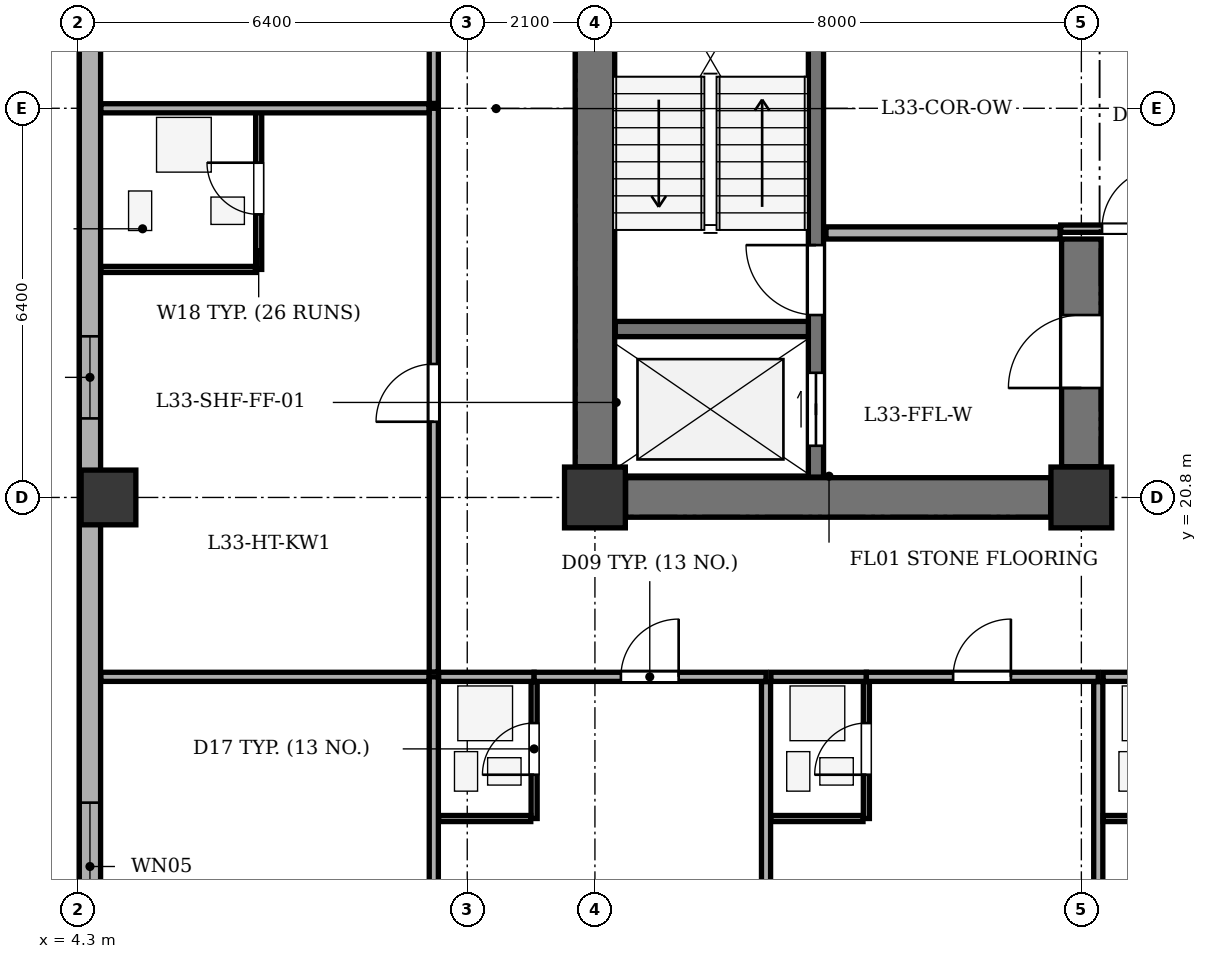
"""IFC4 building model, lengths in metres.
Left out: names, types, materials, properties, quantities, classifications, styles, units other than length and angle.
Written with IfcOpenShell. Run it as: python <this file> out.ifc"""

import sys

from ifc_helpers import new_model, si_unit, direction, frame, frame_2d, origin, origin_2d, place, context, subcontext, project, spatial, rectangle, extrude, element, fill, save


model = new_model("IFC4")
c1 = context("Model", 3, precision=1e-05, world=origin(), true_north=direction((0.0, 1.0)))
c2 = subcontext(c1, "Body", "Model", "MODEL_VIEW")
j1 = project(units=[si_unit("LENGTHUNIT", "METRE"), si_unit("PLANEANGLEUNIT", "RADIAN")], contexts=[c1])
p1 = place(None, origin())
s1 = spatial("IfcSite", under=j1, at=p1, CompositionType="ELEMENT")
p2 = place(p1, origin())
s2 = spatial("IfcBuilding", under=s1, at=p2, CompositionType="ELEMENT")
p3 = place(p2, frame((0.0, 0.0, 134.3)))
s3 = spatial("IfcBuildingStorey", under=s2, at=p3, CompositionType="ELEMENT", Elevation=134.3)
for number, where, z_axis, x_axis in (
    (1, (12.8, 20.8, 0.0), (0.0, 0.0, 1.0), (1.0, 0.0, 0.0)),
    (2, (20.8, 20.8, 0.0), (0.0, 0.0, 1.0), (1.0, 0.0, 0.0)),
):
    element("IfcColumn", number, at=place(p3, frame(where, z_axis=z_axis, x_axis=x_axis)), inside=s3, PredefinedType="COLUMN", context=c2, shape_type="SweptSolid", body=[
        extrude(rectangle(XDim=1.0, YDim=1.0, at=origin_2d()), origin(), (0.0, 0.0, 1.0), 3.5),
    ])
p4 = place(p3, frame((4.8, 20.8, 0.0), z_axis=(0.0, 0.0, 1.0), x_axis=(1.0, 0.0, 0.0)))
e3 = element("IfcColumn", 3, at=p4, inside=s3, PredefinedType="COLUMN", context=c2, shape_type="SweptSolid", body=[
    extrude(rectangle(XDim=0.9, YDim=0.9, at=origin_2d()), origin(), (0.0, 0.0, 1.0), 3.5),
])
p5 = place(p3, frame((4.495, 6.5, 0.0), z_axis=(0.0, 0.0, 1.0), x_axis=(0.0, 1.0, 0.0)))
e4 = element("IfcWall", 4, at=p5, inside=s3, PredefinedType="STANDARD", context=c2, shape_type="SweptSolid", body=[
    extrude(rectangle(XDim=35.0, YDim=0.35, at=frame_2d((17.5, 0.0))), origin(), (0.0, 0.0, 1.0), 2.785),
])
p6 = place(p5, frame((2.595, 0.0, 0.75)))
e5 = element("IfcOpeningElement", 5, at=p6, cuts=e4, PredefinedType="OPENING", context=c2, shape_type="SweptSolid", body=[
    extrude(rectangle(XDim=1.6, YDim=1.75, at=frame_2d((0.8, 0.875))), frame((0.0, 0.185, 0.0), z_axis=(0.0, -1.0, 0.0), x_axis=(1.0, 0.0, 0.0)), (0.0, 0.0, 1.0), 0.37),
])
p7 = place(p5, frame((7.181, 0.0, 0.75)))
e6 = element("IfcOpeningElement", 6, at=p7, cuts=e4, PredefinedType="OPENING", context=c2, shape_type="SweptSolid", body=[
    extrude(rectangle(XDim=2.1, YDim=1.75, at=frame_2d((1.05, 0.875))), frame((0.0, 0.185, 0.0), z_axis=(0.0, -1.0, 0.0), x_axis=(1.0, 0.0, 0.0)), (0.0, 0.0, 1.0), 0.37),
])
p8 = place(p5, frame((15.6, 0.0, 0.75)))
e7 = element("IfcOpeningElement", 7, at=p8, cuts=e4, PredefinedType="OPENING", context=c2, shape_type="SweptSolid", body=[
    extrude(rectangle(XDim=1.35, YDim=1.75, at=frame_2d((0.675, 0.875))), frame((0.0, 0.185, 0.0), z_axis=(0.0, -1.0, 0.0), x_axis=(1.0, 0.0, 0.0)), (0.0, 0.0, 1.0), 0.37),
])
p9 = place(p5, frame((21.752, 0.0, 0.75)))
e8 = element("IfcOpeningElement", 8, at=p9, cuts=e4, PredefinedType="OPENING", context=c2, shape_type="SweptSolid", body=[
    extrude(rectangle(XDim=1.6, YDim=1.75, at=frame_2d((0.8, 0.875))), frame((0.0, 0.185, 0.0), z_axis=(0.0, -1.0, 0.0), x_axis=(1.0, 0.0, 0.0)), (0.0, 0.0, 1.0), 0.37),
])
p10 = place(p5, frame((24.248, 0.0, 0.75)))
e9 = element("IfcOpeningElement", 9, at=p10, cuts=e4, PredefinedType="OPENING", context=c2, shape_type="SweptSolid", body=[
    extrude(rectangle(XDim=1.6, YDim=1.75, at=frame_2d((0.8, 0.875))), frame((0.0, 0.185, 0.0), z_axis=(0.0, -1.0, 0.0), x_axis=(1.0, 0.0, 0.0)), (0.0, 0.0, 1.0), 0.37),
])
p11 = place(p5, frame((31.588, 0.0, 0.75)))
e10 = element("IfcOpeningElement", 10, at=p11, cuts=e4, PredefinedType="OPENING", context=c2, shape_type="SweptSolid", body=[
    extrude(rectangle(XDim=1.6, YDim=1.75, at=frame_2d((0.8, 0.875))), frame((0.0, 0.185, 0.0), z_axis=(0.0, -1.0, 0.0), x_axis=(1.0, 0.0, 0.0)), (0.0, 0.0, 1.0), 0.37),
])
p12 = place(p3, frame((12.8, 21.305, 0.0), z_axis=(0.0, 0.0, 1.0), x_axis=(0.0, 1.0, 0.0)))
e11 = element("IfcWall", 11, at=p12, inside=s3, PredefinedType="SHEAR", context=c2, shape_type="SweptSolid", body=[
    extrude(rectangle(XDim=11.79, YDim=0.65, at=frame_2d((5.895, 0.0))), origin(), (0.0, 0.0, 1.0), 3.2),
])
p13 = place(p3, frame((13.305, 20.8, 0.0), z_axis=(0.0, 0.0, 1.0), x_axis=(1.0, 0.0, 0.0)))
e12 = element("IfcWall", 12, at=p13, inside=s3, PredefinedType="SHEAR", context=c2, shape_type="SweptSolid", body=[
    extrude(rectangle(XDim=6.99, YDim=0.65, at=frame_2d((3.495, 0.0))), origin(), (0.0, 0.0, 1.0), 3.2),
])
p14 = place(p3, frame((20.8, 21.305, 0.0), z_axis=(0.0, 0.0, 1.0), x_axis=(0.0, 1.0, 0.0)))
e13 = element("IfcWall", 13, at=p14, inside=s3, PredefinedType="SHEAR", context=c2, shape_type="SweptSolid", body=[
    extrude(rectangle(XDim=3.745, YDim=0.65, at=frame_2d((1.873, 0.0))), origin(), (0.0, 0.0, 1.0), 3.2),
])
p15 = place(p14, frame((1.295, 0.0, 0.0)))
e14 = element("IfcOpeningElement", 14, at=p15, cuts=e13, PredefinedType="OPENING", context=c2, shape_type="SweptSolid", body=[
    extrude(rectangle(XDim=1.2, YDim=2.15, at=frame_2d((0.6, 1.075))), frame((0.0, 0.335, 0.0), z_axis=(0.0, -1.0, 0.0), x_axis=(1.0, 0.0, 0.0)), (0.0, 0.0, 1.0), 0.67),
])
p16 = place(p3, frame((16.435, 21.135, 0.0), z_axis=(0.0, 0.0, 1.0), x_axis=(0.0, 1.0, 0.0)))
e15 = element("IfcWall", 15, at=p16, inside=s3, PredefinedType="SHEAR", context=c2, shape_type="SweptSolid", body=[
    extrude(rectangle(XDim=12.13, YDim=0.25, at=frame_2d((6.065, 0.0))), origin(), (0.0, 0.0, 1.0), 3.2),
])
p17 = place(p16, frame((0.515, 0.0, 0.0)))
e16 = element("IfcOpeningElement", 16, at=p17, cuts=e15, PredefinedType="OPENING", context=c2, shape_type="SweptSolid", body=[
    extrude(rectangle(XDim=1.2, YDim=2.15, at=frame_2d((0.6, 1.075))), frame((0.0, 0.135, 0.0), z_axis=(0.0, -1.0, 0.0), x_axis=(1.0, 0.0, 0.0)), (0.0, 0.0, 1.0), 0.27),
])
p18 = place(p16, frame((2.665, 0.0, 0.0)))
e17 = element("IfcOpeningElement", 17, at=p18, cuts=e15, PredefinedType="OPENING", context=c2, shape_type="SweptSolid", body=[
    extrude(rectangle(XDim=1.15, YDim=2.15, at=frame_2d((0.575, 1.075))), frame((0.0, 0.135, 0.0), z_axis=(0.0, -1.0, 0.0), x_axis=(1.0, 0.0, 0.0)), (0.0, 0.0, 1.0), 0.27),
])
p19 = place(p3, frame((13.135, 23.57, 0.0), z_axis=(0.0, 0.0, 1.0), x_axis=(1.0, 0.0, 0.0)))
e18 = element("IfcWall", 18, at=p19, inside=s3, PredefinedType="SHEAR", context=c2, shape_type="SweptSolid", body=[
    extrude(rectangle(XDim=3.175, YDim=0.25, at=frame_2d((1.587, 0.0))), origin(), (0.0, 0.0, 1.0), 3.2),
])
p20 = place(p3, frame((16.6, 25.15, 0.0), z_axis=(0.0, 0.0, 1.0), x_axis=(1.0, 0.0, 0.0)))
e19 = element("IfcWall", 19, at=p20, inside=s3, PredefinedType="SOLIDWALL", context=c2, shape_type="SweptSolid", body=[
    extrude(rectangle(XDim=3.85, YDim=0.2, at=frame_2d((1.925, 0.0))), origin(), (0.0, 0.0, 1.0), 3.2),
])
p21 = place(p3, frame((20.46, 25.22, 0.0), z_axis=(0.0, 0.0, 1.0), x_axis=(1.0, 0.0, 0.0)))
e20 = element("IfcWall", 20, at=p21, inside=s3, PredefinedType="PARTITIONING", context=c2, shape_type="SweptSolid", body=[
    extrude(rectangle(XDim=11.94, YDim=0.12, at=frame_2d((5.97, 0.0))), origin(), (0.0, 0.0, 1.0), 3.2),
])
p22 = place(p21, frame((0.68, 0.0, 0.0)))
e21 = element("IfcOpeningElement", 21, at=p22, cuts=e20, PredefinedType="OPENING", context=c2, shape_type="SweptSolid", body=[
    extrude(rectangle(XDim=1.0, YDim=2.1, at=frame_2d((0.5, 1.05))), frame((0.0, 0.07, 0.0), z_axis=(0.0, -1.0, 0.0), x_axis=(1.0, 0.0, 0.0)), (0.0, 0.0, 1.0), 0.14),
])
p23 = place(p3, frame((10.15, 1.875, 0.0), z_axis=(0.0, 0.0, 1.0), x_axis=(0.0, 1.0, 0.0)))
e22 = element("IfcWall", 22, at=p23, inside=s3, PredefinedType="PARTITIONING", context=c2, shape_type="SweptSolid", body=[
    extrude(rectangle(XDim=15.975, YDim=0.15, at=frame_2d((7.988, 0.0))), origin(), (0.0, 0.0, 1.0), 3.2),
])
p24 = place(p3, frame((10.23, 17.85, 0.0), z_axis=(0.0, 0.0, 1.0), x_axis=(1.0, 0.0, 0.0)))
e23 = element("IfcWall", 23, at=p24, inside=s3, PredefinedType="PARTITIONING", context=c2, shape_type="SweptSolid", body=[
    extrude(rectangle(XDim=1.57, YDim=0.15, at=frame_2d((0.785, 0.0))), origin(), (0.0, 0.0, 1.0), 3.2),
])
p25 = place(p3, frame((11.8, 17.85, 0.0), z_axis=(0.0, 0.0, 1.0), x_axis=(1.0, 0.0, 0.0)))
e24 = element("IfcWall", 24, at=p25, inside=s3, PredefinedType="PARTITIONING", context=c2, shape_type="SweptSolid", body=[
    extrude(rectangle(XDim=3.814, YDim=0.15, at=frame_2d((1.907, 0.0))), origin(), (0.0, 0.0, 1.0), 3.2),
])
p26 = place(p25, frame((1.427, 0.0, 0.0)))
e25 = element("IfcOpeningElement", 25, at=p26, cuts=e24, PredefinedType="OPENING", context=c2, shape_type="SweptSolid", body=[
    extrude(rectangle(XDim=0.95, YDim=2.1, at=frame_2d((0.475, 1.05))), frame((0.0, 0.085, 0.0), z_axis=(0.0, -1.0, 0.0), x_axis=(1.0, 0.0, 0.0)), (0.0, 0.0, 1.0), 0.17),
])
p27 = place(p3, frame((11.8, 15.52, 0.0), z_axis=(0.0, 0.0, 1.0), x_axis=(0.0, 1.0, 0.0)))
e26 = element("IfcWall", 26, at=p27, inside=s3, PredefinedType="PARTITIONING", context=c2, shape_type="SweptSolid", body=[
    extrude(rectangle(XDim=2.25, YDim=0.1, at=frame_2d((1.125, 0.0))), origin(), (0.0, 0.0, 1.0), 3.2),
])
p28 = place(p27, frame((0.72, 0.0, 0.0)))
e27 = element("IfcOpeningElement", 27, at=p28, cuts=e26, PredefinedType="OPENING", context=c2, shape_type="SweptSolid", body=[
    extrude(rectangle(XDim=0.85, YDim=2.05, at=frame_2d((0.425, 1.025))), frame((0.0, 0.06, 0.0), z_axis=(0.0, -1.0, 0.0), x_axis=(1.0, 0.0, 0.0)), (0.0, 0.0, 1.0), 0.12),
])
p29 = place(p3, frame((10.23, 15.52, 0.0), z_axis=(0.0, 0.0, 1.0), x_axis=(1.0, 0.0, 0.0)))
e28 = element("IfcWall", 28, at=p29, inside=s3, PredefinedType="PARTITIONING", context=c2, shape_type="SweptSolid", body=[
    extrude(rectangle(XDim=1.515, YDim=0.1, at=frame_2d((0.758, 0.0))), origin(), (0.0, 0.0, 1.0), 3.2),
])
p30 = place(p3, frame((15.614, 1.875, 0.0), z_axis=(0.0, 0.0, 1.0), x_axis=(0.0, 1.0, 0.0)))
e29 = element("IfcWall", 29, at=p30, inside=s3, PredefinedType="PARTITIONING", context=c2, shape_type="SweptSolid", body=[
    extrude(rectangle(XDim=15.895, YDim=0.15, at=frame_2d((7.948, 0.0))), origin(), (0.0, 0.0, 1.0), 3.2),
])
p31 = place(p3, frame((15.694, 17.85, 0.0), z_axis=(0.0, 0.0, 1.0), x_axis=(1.0, 0.0, 0.0)))
e30 = element("IfcWall", 30, at=p31, inside=s3, PredefinedType="PARTITIONING", context=c2, shape_type="SweptSolid", body=[
    extrude(rectangle(XDim=1.57, YDim=0.15, at=frame_2d((0.785, 0.0))), origin(), (0.0, 0.0, 1.0), 3.2),
])
p32 = place(p3, frame((17.264, 17.85, 0.0), z_axis=(0.0, 0.0, 1.0), x_axis=(1.0, 0.0, 0.0)))
e31 = element("IfcWall", 31, at=p32, inside=s3, PredefinedType="PARTITIONING", context=c2, shape_type="SweptSolid", body=[
    extrude(rectangle(XDim=3.814, YDim=0.15, at=frame_2d((1.907, 0.0))), origin(), (0.0, 0.0, 1.0), 3.2),
])
p33 = place(p32, frame((1.427, 0.0, 0.0)))
e32 = element("IfcOpeningElement", 32, at=p33, cuts=e31, PredefinedType="OPENING", context=c2, shape_type="SweptSolid", body=[
    extrude(rectangle(XDim=0.95, YDim=2.1, at=frame_2d((0.475, 1.05))), frame((0.0, 0.085, 0.0), z_axis=(0.0, -1.0, 0.0), x_axis=(1.0, 0.0, 0.0)), (0.0, 0.0, 1.0), 0.17),
])
p34 = place(p3, frame((17.264, 15.52, 0.0), z_axis=(0.0, 0.0, 1.0), x_axis=(0.0, 1.0, 0.0)))
e33 = element("IfcWall", 33, at=p34, inside=s3, PredefinedType="PARTITIONING", context=c2, shape_type="SweptSolid", body=[
    extrude(rectangle(XDim=2.25, YDim=0.1, at=frame_2d((1.125, 0.0))), origin(), (0.0, 0.0, 1.0), 3.2),
])
p35 = place(p34, frame((0.72, 0.0, 0.0)))
e34 = element("IfcOpeningElement", 34, at=p35, cuts=e33, PredefinedType="OPENING", context=c2, shape_type="SweptSolid", body=[
    extrude(rectangle(XDim=0.85, YDim=2.05, at=frame_2d((0.425, 1.025))), frame((0.0, 0.06, 0.0), z_axis=(0.0, -1.0, 0.0), x_axis=(1.0, 0.0, 0.0)), (0.0, 0.0, 1.0), 0.12),
])
p36 = place(p3, frame((15.694, 15.52, 0.0), z_axis=(0.0, 0.0, 1.0), x_axis=(1.0, 0.0, 0.0)))
e35 = element("IfcWall", 35, at=p36, inside=s3, PredefinedType="PARTITIONING", context=c2, shape_type="SweptSolid", body=[
    extrude(rectangle(XDim=1.515, YDim=0.1, at=frame_2d((0.757, 0.0))), origin(), (0.0, 0.0, 1.0), 3.2),
])
p37 = place(p3, frame((21.078, 1.875, 0.0), z_axis=(0.0, 0.0, 1.0), x_axis=(0.0, 1.0, 0.0)))
e36 = element("IfcWall", 36, at=p37, inside=s3, PredefinedType="PARTITIONING", context=c2, shape_type="SweptSolid", body=[
    extrude(rectangle(XDim=15.895, YDim=0.15, at=frame_2d((7.948, 0.0))), origin(), (0.0, 0.0, 1.0), 2.535),
])
p38 = place(p3, frame((21.158, 17.85, 0.0), z_axis=(0.0, 0.0, 1.0), x_axis=(1.0, 0.0, 0.0)))
e37 = element("IfcWall", 37, at=p38, inside=s3, PredefinedType="PARTITIONING", context=c2, shape_type="SweptSolid", body=[
    extrude(rectangle(XDim=1.57, YDim=0.15, at=frame_2d((0.785, 0.0))), origin(), (0.0, 0.0, 1.0), 3.2),
])
p39 = place(p3, frame((21.158, 15.52, 0.0), z_axis=(0.0, 0.0, 1.0), x_axis=(1.0, 0.0, 0.0)))
e38 = element("IfcWall", 38, at=p39, inside=s3, PredefinedType="PARTITIONING", context=c2, shape_type="SweptSolid", body=[
    extrude(rectangle(XDim=1.515, YDim=0.1, at=frame_2d((0.758, 0.0))), origin(), (0.0, 0.0, 1.0), 3.2),
])
p40 = place(p3, frame((4.675, 17.85, 0.0), z_axis=(0.0, 0.0, 1.0), x_axis=(1.0, 0.0, 0.0)))
e39 = element("IfcWall", 39, at=p40, inside=s3, PredefinedType="PARTITIONING", context=c2, shape_type="SweptSolid", body=[
    extrude(rectangle(XDim=5.395, YDim=0.15, at=frame_2d((2.698, 0.0))), origin(), (0.0, 0.0, 1.0), 3.2),
])
p41 = place(p3, frame((10.15, 17.93, 0.0), z_axis=(0.0, 0.0, 1.0), x_axis=(0.0, 1.0, 0.0)))
e40 = element("IfcWall", 40, at=p41, inside=s3, PredefinedType="PARTITIONING", context=c2, shape_type="SweptSolid", body=[
    extrude(rectangle(XDim=9.27, YDim=0.15, at=frame_2d((4.635, 0.0))), origin(), (0.0, 0.0, 1.0), 3.2),
])
p42 = place(p41, frame((4.115, 0.0, 0.0)))
e41 = element("IfcOpeningElement", 41, at=p42, cuts=e40, PredefinedType="OPENING", context=c2, shape_type="SweptSolid", body=[
    extrude(rectangle(XDim=0.95, YDim=2.1, at=frame_2d((0.475, 1.05))), frame((0.0, 0.085, 0.0), z_axis=(0.0, -1.0, 0.0), x_axis=(1.0, 0.0, 0.0)), (0.0, 0.0, 1.0), 0.17),
])
p43 = place(p3, frame((7.27, 24.55, 0.0), z_axis=(0.0, 0.0, 1.0), x_axis=(0.0, 1.0, 0.0)))
e42 = element("IfcWall", 42, at=p43, inside=s3, PredefinedType="PARTITIONING", context=c2, shape_type="SweptSolid", body=[
    extrude(rectangle(XDim=2.65, YDim=0.1, at=frame_2d((1.325, 0.0))), origin(), (0.0, 0.0, 1.0), 3.2),
])
p44 = place(p43, frame((0.905, 0.0, 0.0)))
e43 = element("IfcOpeningElement", 43, at=p44, cuts=e42, PredefinedType="OPENING", context=c2, shape_type="SweptSolid", body=[
    extrude(rectangle(XDim=0.85, YDim=2.05, at=frame_2d((0.425, 1.025))), frame((0.0, 0.06, 0.0), z_axis=(0.0, -1.0, 0.0), x_axis=(1.0, 0.0, 0.0)), (0.0, 0.0, 1.0), 0.12),
])
p45 = place(p3, frame((4.675, 24.55, 0.0), z_axis=(0.0, 0.0, 1.0), x_axis=(1.0, 0.0, 0.0)))
e44 = element("IfcWall", 44, at=p45, inside=s3, PredefinedType="PARTITIONING", context=c2, shape_type="SweptSolid", body=[
    extrude(rectangle(XDim=2.54, YDim=0.1, at=frame_2d((1.27, 0.0))), origin(), (0.0, 0.0, 1.0), 3.2),
])
p46 = place(p3, frame((4.675, 27.2, 0.0), z_axis=(0.0, 0.0, 1.0), x_axis=(1.0, 0.0, 0.0)))
e45 = element("IfcWall", 45, at=p46, inside=s3, PredefinedType="PARTITIONING", context=c2, shape_type="SweptSolid", body=[
    extrude(rectangle(XDim=5.395, YDim=0.15, at=frame_2d((2.698, 0.0))), origin(), (0.0, 0.0, 1.0), 3.2),
])
p47 = place(p3, frame((10.15, 27.28, 0.0), z_axis=(0.0, 0.0, 1.0), x_axis=(0.0, 1.0, 0.0)))
e46 = element("IfcWall", 46, at=p47, inside=s3, PredefinedType="PARTITIONING", context=c2, shape_type="SweptSolid", body=[
    extrude(rectangle(XDim=9.19, YDim=0.15, at=frame_2d((4.595, 0.0))), origin(), (0.0, 0.0, 1.0), 3.2),
])
p48 = place(p47, frame((4.115, 0.0, 0.0)))
e47 = element("IfcOpeningElement", 47, at=p48, cuts=e46, PredefinedType="OPENING", context=c2, shape_type="SweptSolid", body=[
    extrude(rectangle(XDim=0.95, YDim=2.1, at=frame_2d((0.475, 1.05))), frame((0.0, 0.085, 0.0), z_axis=(0.0, -1.0, 0.0), x_axis=(1.0, 0.0, 0.0)), (0.0, 0.0, 1.0), 0.17),
])
p49 = place(p7, origin())
e48 = element("IfcWindow", 48, at=p49, inside=s3, PartitioningType="SINGLE_PANEL", PredefinedType="WINDOW", context=c2, shape_type="SweptSolid", body=[
    extrude(rectangle(XDim=2.1, YDim=1.75, at=frame_2d((1.05, 0.875))), frame((0.0, -0.01, 0.0), z_axis=(0.0, -1.0, 0.0), x_axis=(1.0, 0.0, 0.0)), (0.0, 0.0, 1.0), 0.06),
])
fill(e6, e48)
p50 = place(p8, origin())
e49 = element("IfcWindow", 49, at=p50, inside=s3, PartitioningType="SINGLE_PANEL", PredefinedType="WINDOW", context=c2, shape_type="SweptSolid", body=[
    extrude(rectangle(XDim=1.35, YDim=1.75, at=frame_2d((0.675, 0.875))), frame((0.0, -0.01, 0.0), z_axis=(0.0, -1.0, 0.0), x_axis=(1.0, 0.0, 0.0)), (0.0, 0.0, 1.0), 0.06),
])
fill(e7, e49)
p51 = place(p15, origin())
e50 = element("IfcDoor", 50, at=p51, inside=s3, OperationType="SINGLE_SWING_LEFT", PredefinedType="DOOR", context=c2, shape_type="SweptSolid", body=[
    extrude(rectangle(XDim=1.2, YDim=2.15, at=frame_2d((0.6, 1.075))), frame((0.0, 0.025, 0.0), z_axis=(0.0, -1.0, 0.0), x_axis=(1.0, 0.0, 0.0)), (0.0, 0.0, 1.0), 0.05),
])
fill(e14, e50)
p52 = place(p17, origin())
e51 = element("IfcDoor", 51, at=p52, inside=s3, OperationType="DOUBLE_DOOR_SLIDING", PredefinedType="DOOR", context=c2, shape_type="SweptSolid", body=[
    extrude(rectangle(XDim=1.2, YDim=2.15, at=frame_2d((0.6, 1.075))), frame((0.0, 0.025, 0.0), z_axis=(0.0, -1.0, 0.0), x_axis=(1.0, 0.0, 0.0)), (0.0, 0.0, 1.0), 0.05),
])
fill(e16, e51)
p53 = place(p18, origin())
e52 = element("IfcDoor", 52, at=p53, inside=s3, OperationType="SINGLE_SWING_RIGHT", PredefinedType="DOOR", context=c2, shape_type="SweptSolid", body=[
    extrude(rectangle(XDim=1.15, YDim=2.15, at=frame_2d((0.575, 1.075))), frame((0.0, 0.025, 0.0), z_axis=(0.0, -1.0, 0.0), x_axis=(1.0, 0.0, 0.0)), (0.0, 0.0, 1.0), 0.05),
])
fill(e17, e52)
p54 = place(p22, origin())
e53 = element("IfcDoor", 53, at=p54, inside=s3, OperationType="SINGLE_SWING_RIGHT", PredefinedType="DOOR", context=c2, shape_type="SweptSolid", body=[
    extrude(rectangle(XDim=1.0, YDim=2.1, at=frame_2d((0.5, 1.05))), frame((0.0, 0.025, 0.0), z_axis=(0.0, -1.0, 0.0), x_axis=(1.0, 0.0, 0.0)), (0.0, 0.0, 1.0), 0.05),
])
fill(e21, e53)
p55 = place(p28, origin())
e54 = element("IfcDoor", 54, at=p55, inside=s3, OperationType="SINGLE_SWING_LEFT", PredefinedType="DOOR", context=c2, shape_type="SweptSolid", body=[
    extrude(rectangle(XDim=0.85, YDim=2.05, at=frame_2d((0.425, 1.025))), frame((0.0, 0.025, 0.0), z_axis=(0.0, -1.0, 0.0), x_axis=(1.0, 0.0, 0.0)), (0.0, 0.0, 1.0), 0.05),
])
fill(e27, e54)
p56 = place(p26, origin())
e55 = element("IfcDoor", 55, at=p56, inside=s3, OperationType="SINGLE_SWING_RIGHT", PredefinedType="DOOR", context=c2, shape_type="SweptSolid", body=[
    extrude(rectangle(XDim=0.95, YDim=2.1, at=frame_2d((0.475, 1.05))), frame((0.0, 0.025, 0.0), z_axis=(0.0, -1.0, 0.0), x_axis=(1.0, 0.0, 0.0)), (0.0, 0.0, 1.0), 0.05),
])
fill(e25, e55)
p57 = place(p35, origin())
e56 = element("IfcDoor", 56, at=p57, inside=s3, OperationType="SINGLE_SWING_LEFT", PredefinedType="DOOR", context=c2, shape_type="SweptSolid", body=[
    extrude(rectangle(XDim=0.85, YDim=2.05, at=frame_2d((0.425, 1.025))), frame((0.0, 0.025, 0.0), z_axis=(0.0, -1.0, 0.0), x_axis=(1.0, 0.0, 0.0)), (0.0, 0.0, 1.0), 0.05),
])
fill(e34, e56)
p58 = place(p33, origin())
e57 = element("IfcDoor", 57, at=p58, inside=s3, OperationType="SINGLE_SWING_RIGHT", PredefinedType="DOOR", context=c2, shape_type="SweptSolid", body=[
    extrude(rectangle(XDim=0.95, YDim=2.1, at=frame_2d((0.475, 1.05))), frame((0.0, 0.025, 0.0), z_axis=(0.0, -1.0, 0.0), x_axis=(1.0, 0.0, 0.0)), (0.0, 0.0, 1.0), 0.05),
])
fill(e32, e57)
p59 = place(p44, origin())
e58 = element("IfcDoor", 58, at=p59, inside=s3, OperationType="SINGLE_SWING_RIGHT", PredefinedType="DOOR", context=c2, shape_type="SweptSolid", body=[
    extrude(rectangle(XDim=0.85, YDim=2.05, at=frame_2d((0.425, 1.025))), frame((0.0, 0.025, 0.0), z_axis=(0.0, -1.0, 0.0), x_axis=(1.0, 0.0, 0.0)), (0.0, 0.0, 1.0), 0.05),
])
fill(e43, e58)
p60 = place(p42, origin())
e59 = element("IfcDoor", 59, at=p60, inside=s3, OperationType="SINGLE_SWING_LEFT", PredefinedType="DOOR", context=c2, shape_type="SweptSolid", body=[
    extrude(rectangle(XDim=0.95, YDim=2.1, at=frame_2d((0.475, 1.05))), frame((0.0, 0.025, 0.0), z_axis=(0.0, -1.0, 0.0), x_axis=(1.0, 0.0, 0.0)), (0.0, 0.0, 1.0), 0.05),
])
fill(e41, e59)
save(model, sys.argv[1])
